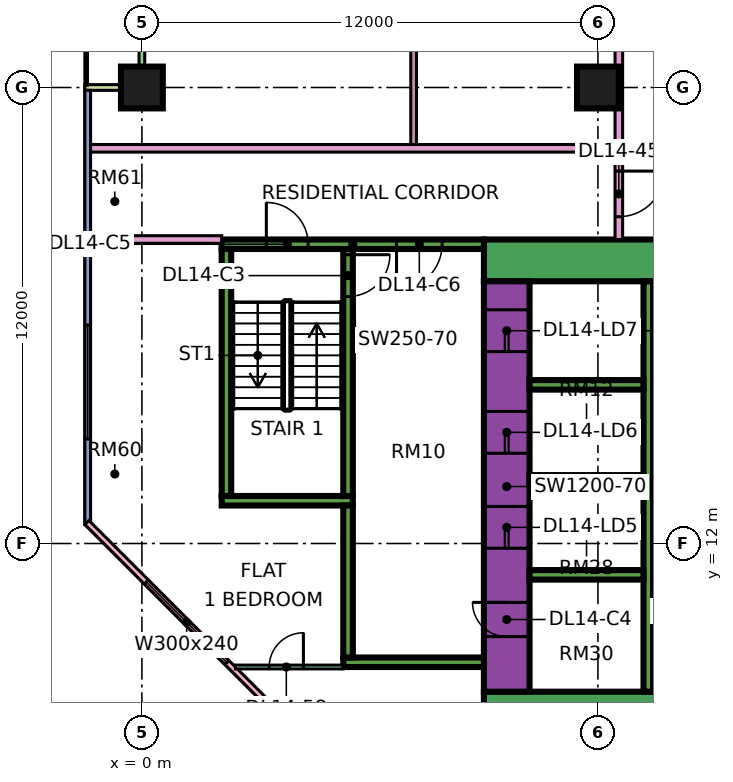
"""IFC4 building model, lengths in metres.
Left out: names, types, materials, properties, quantities, classifications, styles, units other than length and angle.
Written with IfcOpenShell. Run it as: python <this file> out.ifc"""

import sys

from ifc_helpers import new_model, si_unit, direction, frame, frame_2d, origin, origin_2d, place, context, subcontext, project, spatial, rectangle, extrude, element, fill, save


model = new_model("IFC4")
c1 = context("Model", 3, precision=1e-05, world=origin(), true_north=direction((0.0, 1.0)))
c2 = subcontext(c1, "Body", "Model", "MODEL_VIEW")
j1 = project(units=[si_unit("LENGTHUNIT", "METRE"), si_unit("PLANEANGLEUNIT", "RADIAN")], contexts=[c1])
p1 = place(None, origin())
s1 = spatial("IfcSite", under=j1, at=p1, CompositionType="ELEMENT")
p2 = place(p1, origin())
s2 = spatial("IfcBuilding", under=s1, at=p2, CompositionType="ELEMENT")
p3 = place(p2, frame((0.0, 0.0, 67.65)))
s3 = spatial("IfcBuildingStorey", under=s2, at=p3, CompositionType="ELEMENT", Elevation=67.65)
for number, where, z_axis, x_axis in (
    (1, (0.0, 24.0, 0.0), (0.0, 0.0, 1.0), (1.0, 0.0, 0.0)),
    (2, (12.0, 24.0, 0.0), (0.0, 0.0, 1.0), (1.0, 0.0, 0.0)),
):
    element("IfcColumn", number, at=place(p3, frame(where, z_axis=z_axis, x_axis=x_axis)), inside=s3, PredefinedType="COLUMN", context=c2, shape_type="SweptSolid", body=[
        extrude(rectangle(XDim=1.1, YDim=1.1, at=origin_2d()), origin(), (0.0, 0.0, 1.0), 3.75),
    ])
p4 = place(p3, frame((9.0, 7.55, 0.0), z_axis=(0.0, 0.0, 1.0), x_axis=(1.0, 0.0, 0.0)))
e3 = element("IfcWall", 3, at=p4, inside=s3, PredefinedType="SHEAR", context=c2, shape_type="SweptSolid", body=[
    extrude(rectangle(XDim=25.0, YDim=1.1, at=frame_2d((12.5, 0.0))), origin(), (0.0, 0.0, 1.0), 3.75),
])
p5 = place(p3, frame((9.0, 19.45, 0.0), z_axis=(0.0, 0.0, 1.0), x_axis=(1.0, 0.0, 0.0)))
e4 = element("IfcWall", 4, at=p5, inside=s3, PredefinedType="SHEAR", context=c2, shape_type="SweptSolid", body=[
    extrude(rectangle(XDim=25.0, YDim=1.1, at=frame_2d((12.5, 0.0))), origin(), (0.0, 0.0, 1.0), 3.75),
])
p6 = place(p5, frame((19.1, 0.0, 0.0)))
e5 = element("IfcOpeningElement", 5, at=p6, cuts=e4, PredefinedType="OPENING", context=c2, shape_type="SweptSolid", body=[
    extrude(rectangle(XDim=1.8, YDim=2.4, at=frame_2d((0.9, 1.2))), frame((0.0, 0.56, 0.0), z_axis=(0.0, -1.0, 0.0), x_axis=(1.0, 0.0, 0.0)), (0.0, 0.0, 1.0), 1.12),
])
p7 = place(p3, frame((9.6, 8.1, 0.0), z_axis=(0.0, 0.0, 1.0), x_axis=(0.0, 1.0, 0.0)))
e6 = element("IfcWall", 6, at=p7, inside=s3, PredefinedType="SHEAR", context=c2, shape_type="SweptSolid", body=[
    extrude(rectangle(XDim=10.8, YDim=1.2, at=frame_2d((5.4, 0.0))), origin(), (0.0, 0.0, 1.0), 3.75),
])
p8 = place(p7, frame((3.775, 0.0, 0.0)))
e7 = element("IfcOpeningElement", 7, at=p8, cuts=e6, PredefinedType="OPENING", context=c2, shape_type="SweptSolid", body=[
    extrude(rectangle(XDim=1.1, YDim=2.2, at=frame_2d((0.55, 1.1))), frame((0.0, 0.61, 0.0), z_axis=(0.0, -1.0, 0.0), x_axis=(1.0, 0.0, 0.0)), (0.0, 0.0, 1.0), 1.22),
])
p9 = place(p7, frame((6.275, 0.0, 0.0)))
e8 = element("IfcOpeningElement", 8, at=p9, cuts=e6, PredefinedType="OPENING", context=c2, shape_type="SweptSolid", body=[
    extrude(rectangle(XDim=1.1, YDim=2.2, at=frame_2d((0.55, 1.1))), frame((0.0, 0.61, 0.0), z_axis=(0.0, -1.0, 0.0), x_axis=(1.0, 0.0, 0.0)), (0.0, 0.0, 1.0), 1.22),
])
p10 = place(p7, frame((8.95, 0.0, 0.0)))
e9 = element("IfcOpeningElement", 9, at=p10, cuts=e6, PredefinedType="OPENING", context=c2, shape_type="SweptSolid", body=[
    extrude(rectangle(XDim=1.1, YDim=2.2, at=frame_2d((0.55, 1.1))), frame((0.0, 0.61, 0.0), z_axis=(0.0, -1.0, 0.0), x_axis=(1.0, 0.0, 0.0)), (0.0, 0.0, 1.0), 1.22),
])
p11 = place(p7, frame((1.45, 0.0, 0.0)))
e10 = element("IfcOpeningElement", 10, at=p11, cuts=e6, PredefinedType="OPENING", context=c2, shape_type="SweptSolid", body=[
    extrude(rectangle(XDim=0.9, YDim=2.1, at=frame_2d((0.45, 1.05))), frame((0.0, 0.61, 0.0), z_axis=(0.0, -1.0, 0.0), x_axis=(1.0, 0.0, 0.0)), (0.0, 0.0, 1.0), 1.22),
])
p12 = place(p3, frame((13.325, 8.1, 0.0), z_axis=(0.0, 0.0, 1.0), x_axis=(0.0, 1.0, 0.0)))
e11 = element("IfcWall", 11, at=p12, inside=s3, PredefinedType="SHEAR", context=c2, shape_type="SweptSolid", body=[
    extrude(rectangle(XDim=10.8, YDim=0.25, at=frame_2d((5.4, 0.0))), origin(), (0.0, 0.0, 1.0), 3.75),
])
p13 = place(p3, frame((13.45, 11.325, 0.0), z_axis=(0.0, 0.0, 1.0), x_axis=(1.0, 0.0, 0.0)))
e12 = element("IfcWall", 12, at=p13, inside=s3, PredefinedType="SHEAR", context=c2, shape_type="SweptSolid", body=[
    extrude(rectangle(XDim=19.45, YDim=0.25, at=frame_2d((9.725, 0.0))), origin(), (0.0, 0.0, 1.0), 3.75),
])
p14 = place(p13, frame((0.65, 0.0, 0.0)))
e13 = element("IfcOpeningElement", 13, at=p14, cuts=e12, PredefinedType="OPENING", context=c2, shape_type="SweptSolid", body=[
    extrude(rectangle(XDim=1.2, YDim=2.2, at=frame_2d((0.6, 1.1))), frame((0.0, 0.135, 0.0), z_axis=(0.0, -1.0, 0.0), x_axis=(1.0, 0.0, 0.0)), (0.0, 0.0, 1.0), 0.27),
])
p15 = place(p13, frame((3.4, 0.0, 0.0)))
e14 = element("IfcOpeningElement", 14, at=p15, cuts=e12, PredefinedType="OPENING", context=c2, shape_type="SweptSolid", body=[
    extrude(rectangle(XDim=1.2, YDim=2.2, at=frame_2d((0.6, 1.1))), frame((0.0, 0.135, 0.0), z_axis=(0.0, -1.0, 0.0), x_axis=(1.0, 0.0, 0.0)), (0.0, 0.0, 1.0), 0.27),
])
p16 = place(p13, frame((6.15, 0.0, 0.0)))
e15 = element("IfcOpeningElement", 15, at=p16, cuts=e12, PredefinedType="OPENING", context=c2, shape_type="SweptSolid", body=[
    extrude(rectangle(XDim=1.2, YDim=2.2, at=frame_2d((0.6, 1.1))), frame((0.0, 0.135, 0.0), z_axis=(0.0, -1.0, 0.0), x_axis=(1.0, 0.0, 0.0)), (0.0, 0.0, 1.0), 0.27),
])
p17 = place(p13, frame((8.9, 0.0, 0.0)))
e16 = element("IfcOpeningElement", 16, at=p17, cuts=e12, PredefinedType="OPENING", context=c2, shape_type="SweptSolid", body=[
    extrude(rectangle(XDim=1.2, YDim=2.2, at=frame_2d((0.6, 1.1))), frame((0.0, 0.135, 0.0), z_axis=(0.0, -1.0, 0.0), x_axis=(1.0, 0.0, 0.0)), (0.0, 0.0, 1.0), 0.27),
])
p18 = place(p3, frame((13.45, 15.675, 0.0), z_axis=(0.0, 0.0, 1.0), x_axis=(1.0, 0.0, 0.0)))
e17 = element("IfcWall", 17, at=p18, inside=s3, PredefinedType="SHEAR", context=c2, shape_type="SweptSolid", body=[
    extrude(rectangle(XDim=13.75, YDim=0.25, at=frame_2d((6.875, 0.0))), origin(), (0.0, 0.0, 1.0), 3.75),
])
for number, where, z_axis, x_axis in (
    (18, (10.2, 11.175, 0.0), (0.0, 0.0, 1.0), (1.0, 0.0, 0.0)),
    (19, (10.2, 13.675, 0.0), (0.0, 0.0, 1.0), (1.0, 0.0, 0.0)),
    (20, (10.2, 16.175, 0.0), (0.0, 0.0, 1.0), (1.0, 0.0, 0.0)),
):
    element("IfcWall", number, at=place(p3, frame(where, z_axis=z_axis, x_axis=x_axis)), inside=s3, PredefinedType="SHEAR", context=c2, shape_type="SweptSolid", body=[
        extrude(rectangle(XDim=3.0, YDim=0.25, at=frame_2d((1.5, 0.0))), origin(), (0.0, 0.0, 1.0), 3.75),
    ])
p19 = place(p3, frame((2.1, 19.875, 0.0), z_axis=(0.0, 0.0, 1.0), x_axis=(1.0, 0.0, 0.0)))
e21 = element("IfcWall", 21, at=p19, inside=s3, PredefinedType="SHEAR", context=c2, shape_type="SweptSolid", body=[
    extrude(rectangle(XDim=6.9, YDim=0.25, at=frame_2d((3.45, 0.0))), origin(), (0.0, 0.0, 1.0), 3.75),
])
p20 = place(p19, frame((1.175, 0.0, 0.0)))
e22 = element("IfcOpeningElement", 22, at=p20, cuts=e21, PredefinedType="OPENING", context=c2, shape_type="SweptSolid", body=[
    extrude(rectangle(XDim=1.1, YDim=2.2, at=frame_2d((0.55, 1.1))), frame((0.0, 0.135, 0.0), z_axis=(0.0, -1.0, 0.0), x_axis=(1.0, 0.0, 0.0)), (0.0, 0.0, 1.0), 0.27),
])
p21 = place(p19, frame((4.6, 0.0, 0.0)))
e23 = element("IfcOpeningElement", 23, at=p21, cuts=e21, PredefinedType="OPENING", context=c2, shape_type="SweptSolid", body=[
    extrude(rectangle(XDim=1.2, YDim=2.2, at=frame_2d((0.6, 1.1))), frame((0.0, 0.135, 0.0), z_axis=(0.0, -1.0, 0.0), x_axis=(1.0, 0.0, 0.0)), (0.0, 0.0, 1.0), 0.27),
])
p22 = place(p3, frame((2.1, 13.125, 0.0), z_axis=(0.0, 0.0, 1.0), x_axis=(1.0, 0.0, 0.0)))
e24 = element("IfcWall", 24, at=p22, inside=s3, PredefinedType="SHEAR", context=c2, shape_type="SweptSolid", body=[
    extrude(rectangle(XDim=3.45, YDim=0.25, at=frame_2d((1.725, 0.0))), origin(), (0.0, 0.0, 1.0), 3.75),
])
p23 = place(p3, frame((2.225, 13.25, 0.0), z_axis=(0.0, 0.0, 1.0), x_axis=(0.0, 1.0, 0.0)))
e25 = element("IfcWall", 25, at=p23, inside=s3, PredefinedType="SHEAR", context=c2, shape_type="SweptSolid", body=[
    extrude(rectangle(XDim=6.5, YDim=0.25, at=frame_2d((3.25, 0.0))), origin(), (0.0, 0.0, 1.0), 3.75),
])
p24 = place(p3, frame((5.425, 13.25, 0.0), z_axis=(0.0, 0.0, 1.0), x_axis=(0.0, 1.0, 0.0)))
e26 = element("IfcWall", 26, at=p24, inside=s3, PredefinedType="SHEAR", context=c2, shape_type="SweptSolid", body=[
    extrude(rectangle(XDim=6.5, YDim=0.25, at=frame_2d((3.25, 0.0))), origin(), (0.0, 0.0, 1.0), 3.75),
])
p25 = place(p24, frame((5.25, 0.0, 0.0)))
e27 = element("IfcOpeningElement", 27, at=p25, cuts=e26, PredefinedType="OPENING", context=c2, shape_type="SweptSolid", body=[
    extrude(rectangle(XDim=1.1, YDim=2.2, at=frame_2d((0.55, 1.1))), frame((0.0, 0.135, 0.0), z_axis=(0.0, -1.0, 0.0), x_axis=(1.0, 0.0, 0.0)), (0.0, 0.0, 1.0), 0.27),
])
p26 = place(p3, frame((5.3, 8.875, 0.0), z_axis=(0.0, 0.0, 1.0), x_axis=(1.0, 0.0, 0.0)))
e28 = element("IfcWall", 28, at=p26, inside=s3, PredefinedType="SHEAR", context=c2, shape_type="SweptSolid", body=[
    extrude(rectangle(XDim=3.7, YDim=0.25, at=frame_2d((1.85, 0.0))), origin(), (0.0, 0.0, 1.0), 3.75),
])
p27 = place(p3, frame((5.425, 9.0, 0.0), z_axis=(0.0, 0.0, 1.0), x_axis=(0.0, 1.0, 0.0)))
e29 = element("IfcWall", 29, at=p27, inside=s3, PredefinedType="SHEAR", context=c2, shape_type="SweptSolid", body=[
    extrude(rectangle(XDim=4.0, YDim=0.25, at=frame_2d((2.0, 0.0))), origin(), (0.0, 0.0, 1.0), 3.75),
])
p28 = place(p3, frame((0.0, 35.925, 0.0), z_axis=(0.0, 0.0, 1.0), x_axis=(0.0, -1.0, 0.0)))
e30 = element("IfcWall", 30, at=p28, inside=s3, PredefinedType="SOLIDWALL", context=c2, shape_type="SweptSolid", body=[
    extrude(rectangle(XDim=11.85, YDim=0.15, at=frame_2d((5.925, 0.0))), origin(), (0.0, 0.0, 1.0), 3.35),
])
p29 = place(p28, frame((2.35, 0.0, 0.0)))
e31 = element("IfcOpeningElement", 31, at=p29, cuts=e30, PredefinedType="OPENING", context=c2, shape_type="SweptSolid", body=[
    extrude(rectangle(XDim=1.8, YDim=2.4, at=frame_2d((0.9, 1.2))), frame((0.0, 0.085, 0.0), z_axis=(0.0, -1.0, 0.0), x_axis=(1.0, 0.0, 0.0)), (0.0, 0.0, 1.0), 0.17),
])
p30 = place(p28, frame((7.1, 0.0, 0.45)))
e32 = element("IfcOpeningElement", 32, at=p30, cuts=e30, PredefinedType="OPENING", context=c2, shape_type="SweptSolid", body=[
    extrude(rectangle(XDim=3.0, YDim=2.4, at=frame_2d((1.5, 1.2))), frame((0.0, 0.085, 0.0), z_axis=(0.0, -1.0, 0.0), x_axis=(1.0, 0.0, 0.0)), (0.0, 0.0, 1.0), 0.17),
])
p31 = place(p3, frame((-1.5, 24.0, 0.0), z_axis=(0.0, 0.0, 1.0), x_axis=(1.0, 0.0, 0.0)))
e33 = element("IfcWall", 33, at=p31, inside=s3, PredefinedType="SOLIDWALL", context=c2, shape_type="SweptSolid", body=[
    extrude(rectangle(XDim=1.5, YDim=0.15, at=frame_2d((0.75, 0.0))), origin(), (0.0, 0.0, 1.0), 3.35),
])
p32 = place(p3, frame((-1.425, 23.925, 0.0), z_axis=(0.0, 0.0, 1.0), x_axis=(0.0, -1.0, 0.0)))
e34 = element("IfcWall", 34, at=p32, inside=s3, PredefinedType="SOLIDWALL", context=c2, shape_type="SweptSolid", body=[
    extrude(rectangle(XDim=11.425, YDim=0.15, at=frame_2d((5.712, 0.0))), origin(), (0.0, 0.0, 1.0), 3.35),
])
p33 = place(p32, frame((6.175, 0.0, 0.45)))
e35 = element("IfcOpeningElement", 35, at=p33, cuts=e34, PredefinedType="OPENING", context=c2, shape_type="SweptSolid", body=[
    extrude(rectangle(XDim=3.0, YDim=2.4, at=frame_2d((1.5, 1.2))), frame((0.0, 0.085, 0.0), z_axis=(0.0, -1.0, 0.0), x_axis=(1.0, 0.0, 0.0)), (0.0, 0.0, 1.0), 0.17),
])
p34 = place(p3, frame((-1.447, 12.553, 0.0), z_axis=(0.0, 0.0, 1.0), x_axis=(0.707106781187, -0.707106781187, 0.0)))
e36 = element("IfcWall", 36, at=p34, inside=s3, PredefinedType="SOLIDWALL", context=c2, shape_type="SweptSolid", body=[
    extrude(rectangle(XDim=19.799, YDim=0.15, at=frame_2d((9.899, 0.0))), origin(), (0.0, 0.0, 1.0), 3.35),
])
p35 = place(p34, frame((2.212, 0.0, 0.45)))
e37 = element("IfcOpeningElement", 37, at=p35, cuts=e36, PredefinedType="OPENING", context=c2, shape_type="SweptSolid", body=[
    extrude(rectangle(XDim=3.0, YDim=2.4, at=frame_2d((1.5, 1.2))), frame((0.0, 0.085, 0.0), z_axis=(0.0, -1.0, 0.0), x_axis=(1.0, 0.0, 0.0)), (0.0, 0.0, 1.0), 0.17),
])
p36 = place(p34, frame((10.216, 0.0, 0.45)))
e38 = element("IfcOpeningElement", 38, at=p36, cuts=e36, PredefinedType="OPENING", context=c2, shape_type="SweptSolid", body=[
    extrude(rectangle(XDim=3.0, YDim=2.4, at=frame_2d((1.5, 1.2))), frame((0.0, 0.085, 0.0), z_axis=(0.0, -1.0, 0.0), x_axis=(1.0, 0.0, 0.0)), (0.0, 0.0, 1.0), 0.17),
])
p37 = place(p3, frame((-1.35, 20.0, 0.0), z_axis=(0.0, 0.0, 1.0), x_axis=(1.0, 0.0, 0.0)))
e39 = element("IfcWall", 39, at=p37, inside=s3, PredefinedType="PARTITIONING", context=c2, shape_type="SweptSolid", body=[
    extrude(rectangle(XDim=3.45, YDim=0.2, at=frame_2d((1.725, 0.0))), origin(), (0.0, 0.0, 1.0), 3.35),
])
p38 = place(p3, frame((-1.35, 22.4, 0.0), z_axis=(0.0, 0.0, 1.0), x_axis=(1.0, 0.0, 0.0)))
e40 = element("IfcWall", 40, at=p38, inside=s3, PredefinedType="PARTITIONING", context=c2, shape_type="SweptSolid", body=[
    extrude(rectangle(XDim=13.8, YDim=0.2, at=frame_2d((6.9, 0.0))), origin(), (0.0, 0.0, 1.0), 3.35),
])
p39 = place(p3, frame((2.461, 8.75, 0.0), z_axis=(0.0, 0.0, 1.0), x_axis=(1.0, 0.0, 0.0)))
e41 = element("IfcWall", 41, at=p39, inside=s3, PredefinedType="PARTITIONING", context=c2, shape_type="SweptSolid", body=[
    extrude(rectangle(XDim=2.839, YDim=0.1, at=frame_2d((1.419, 0.0))), origin(), (0.0, 0.0, 1.0), 3.35),
])
p40 = place(p39, frame((0.889, 0.0, 0.0)))
e42 = element("IfcOpeningElement", 42, at=p40, cuts=e41, PredefinedType="OPENING", context=c2, shape_type="SweptSolid", body=[
    extrude(rectangle(XDim=0.9, YDim=2.1, at=frame_2d((0.45, 1.05))), frame((0.0, 0.06, 0.0), z_axis=(0.0, -1.0, 0.0), x_axis=(1.0, 0.0, 0.0)), (0.0, 0.0, 1.0), 0.12),
])
p41 = place(p3, frame((7.15, 22.5, 0.0), z_axis=(0.0, 0.0, 1.0), x_axis=(0.0, 1.0, 0.0)))
e43 = element("IfcWall", 43, at=p41, inside=s3, PredefinedType="PARTITIONING", context=c2, shape_type="SweptSolid", body=[
    extrude(rectangle(XDim=11.175, YDim=0.15, at=frame_2d((5.587, 0.0))), origin(), (0.0, 0.0, 1.0), 3.35),
])
p42 = place(p41, frame((2.9, 0.0, 0.0)))
e44 = element("IfcOpeningElement", 44, at=p42, cuts=e43, PredefinedType="OPENING", context=c2, shape_type="SweptSolid", body=[
    extrude(rectangle(XDim=0.9, YDim=2.1, at=frame_2d((0.45, 1.05))), frame((0.0, 0.085, 0.0), z_axis=(0.0, -1.0, 0.0), x_axis=(1.0, 0.0, 0.0)), (0.0, 0.0, 1.0), 0.17),
])
p43 = place(p3, frame((12.55, 20.0, 0.0), z_axis=(0.0, 0.0, 1.0), x_axis=(0.0, 1.0, 0.0)))
e45 = element("IfcWall", 45, at=p43, inside=s3, PredefinedType="PARTITIONING", context=c2, shape_type="SweptSolid", body=[
    extrude(rectangle(XDim=43.0, YDim=0.2, at=frame_2d((21.5, 0.0))), origin(), (0.0, 0.0, 1.0), 3.35),
])
p44 = place(p43, frame((25.8, 0.0, 0.0)))
e46 = element("IfcOpeningElement", 46, at=p44, cuts=e45, PredefinedType="OPENING", context=c2, shape_type="SweptSolid", body=[
    extrude(rectangle(XDim=1.0, YDim=2.1, at=frame_2d((0.5, 1.05))), frame((0.0, 0.11, 0.0), z_axis=(0.0, -1.0, 0.0), x_axis=(1.0, 0.0, 0.0)), (0.0, 0.0, 1.0), 0.22),
])
p45 = place(p43, frame((0.6, 0.0, 0.0)))
e47 = element("IfcOpeningElement", 47, at=p45, cuts=e45, PredefinedType="OPENING", context=c2, shape_type="SweptSolid", body=[
    extrude(rectangle(XDim=1.2, YDim=2.1, at=frame_2d((0.6, 1.05))), frame((0.0, 0.11, 0.0), z_axis=(0.0, -1.0, 0.0), x_axis=(1.0, 0.0, 0.0)), (0.0, 0.0, 1.0), 0.22),
])
p46 = place(p43, frame((14.25, 0.0, 0.0)))
e48 = element("IfcOpeningElement", 48, at=p46, cuts=e45, PredefinedType="OPENING", context=c2, shape_type="SweptSolid", body=[
    extrude(rectangle(XDim=1.0, YDim=2.1, at=frame_2d((0.5, 1.05))), frame((0.0, 0.11, 0.0), z_axis=(0.0, -1.0, 0.0), x_axis=(1.0, 0.0, 0.0)), (0.0, 0.0, 1.0), 0.22),
])
p47 = place(p33, origin())
e49 = element("IfcWindow", 49, at=p47, inside=s3, PartitioningType="SINGLE_PANEL", PredefinedType="WINDOW", context=c2, shape_type="SweptSolid", body=[
    extrude(rectangle(XDim=3.0, YDim=2.4, at=frame_2d((1.5, 1.2))), frame((0.0, 0.03, 0.0), z_axis=(0.0, -1.0, 0.0), x_axis=(1.0, 0.0, 0.0)), (0.0, 0.0, 1.0), 0.06),
])
fill(e35, e49)
p48 = place(p35, origin())
e50 = element("IfcWindow", 50, at=p48, inside=s3, PartitioningType="SINGLE_PANEL", PredefinedType="WINDOW", context=c2, shape_type="SweptSolid", body=[
    extrude(rectangle(XDim=3.0, YDim=2.4, at=frame_2d((1.5, 1.2))), frame((0.0, 0.03, 0.0), z_axis=(0.0, -1.0, 0.0), x_axis=(1.0, 0.0, 0.0)), (0.0, 0.0, 1.0), 0.06),
])
fill(e37, e50)
p49 = place(p8, origin())
e51 = element("IfcDoor", 51, at=p49, inside=s3, OperationType="DOUBLE_DOOR_SLIDING", PredefinedType="DOOR", context=c2, shape_type="SweptSolid", body=[
    extrude(rectangle(XDim=1.1, YDim=2.2, at=frame_2d((0.55, 1.1))), frame((0.0, 0.025, 0.0), z_axis=(0.0, -1.0, 0.0), x_axis=(1.0, 0.0, 0.0)), (0.0, 0.0, 1.0), 0.05),
])
fill(e7, e51)
p50 = place(p9, origin())
e52 = element("IfcDoor", 52, at=p50, inside=s3, OperationType="DOUBLE_DOOR_SLIDING", PredefinedType="DOOR", context=c2, shape_type="SweptSolid", body=[
    extrude(rectangle(XDim=1.1, YDim=2.2, at=frame_2d((0.55, 1.1))), frame((0.0, 0.025, 0.0), z_axis=(0.0, -1.0, 0.0), x_axis=(1.0, 0.0, 0.0)), (0.0, 0.0, 1.0), 0.05),
])
fill(e8, e52)
p51 = place(p10, origin())
e53 = element("IfcDoor", 53, at=p51, inside=s3, OperationType="DOUBLE_DOOR_SLIDING", PredefinedType="DOOR", context=c2, shape_type="SweptSolid", body=[
    extrude(rectangle(XDim=1.1, YDim=2.2, at=frame_2d((0.55, 1.1))), frame((0.0, 0.025, 0.0), z_axis=(0.0, -1.0, 0.0), x_axis=(1.0, 0.0, 0.0)), (0.0, 0.0, 1.0), 0.05),
])
fill(e9, e53)
p52 = place(p25, origin())
e54 = element("IfcDoor", 54, at=p52, inside=s3, OperationType="SINGLE_SWING_RIGHT", PredefinedType="DOOR", context=c2, shape_type="SweptSolid", body=[
    extrude(rectangle(XDim=1.1, YDim=2.2, at=frame_2d((0.55, 1.1))), frame((0.0, 0.025, 0.0), z_axis=(0.0, -1.0, 0.0), x_axis=(1.0, 0.0, 0.0)), (0.0, 0.0, 1.0), 0.05),
])
fill(e27, e54)
p53 = place(p11, frame((0.9, 0.0, 0.0), z_axis=(0.0, 0.0, 1.0), x_axis=(-1.0, 0.0, 0.0)))
e55 = element("IfcDoor", 55, at=p53, inside=s3, OperationType="SINGLE_SWING_RIGHT", PredefinedType="DOOR", context=c2, shape_type="SweptSolid", body=[
    extrude(rectangle(XDim=0.9, YDim=2.1, at=frame_2d((0.45, 1.05))), frame((0.0, 0.025, 0.0), z_axis=(0.0, -1.0, 0.0), x_axis=(1.0, 0.0, 0.0)), (0.0, 0.0, 1.0), 0.05),
])
fill(e10, e55)
p54 = place(p20, origin())
e56 = element("IfcDoor", 56, at=p54, inside=s3, OperationType="SINGLE_SWING_LEFT", PredefinedType="DOOR", context=c2, shape_type="SweptSolid", body=[
    extrude(rectangle(XDim=1.1, YDim=2.2, at=frame_2d((0.55, 1.1))), frame((0.0, 0.025, 0.0), z_axis=(0.0, -1.0, 0.0), x_axis=(1.0, 0.0, 0.0)), (0.0, 0.0, 1.0), 0.05),
])
fill(e22, e56)
p55 = place(p21, frame((1.2, 0.0, 0.0), z_axis=(0.0, 0.0, 1.0), x_axis=(-1.0, 0.0, 0.0)))
e57 = element("IfcDoor", 57, at=p55, inside=s3, OperationType="SINGLE_SWING_LEFT", PredefinedType="DOOR", context=c2, shape_type="SweptSolid", body=[
    extrude(rectangle(XDim=1.2, YDim=2.2, at=frame_2d((0.6, 1.1))), frame((0.0, 0.025, 0.0), z_axis=(0.0, -1.0, 0.0), x_axis=(1.0, 0.0, 0.0)), (0.0, 0.0, 1.0), 0.05),
])
fill(e23, e57)
p56 = place(p45, origin())
e58 = element("IfcDoor", 58, at=p56, inside=s3, OperationType="SINGLE_SWING_RIGHT", PredefinedType="DOOR", context=c2, shape_type="SweptSolid", body=[
    extrude(rectangle(XDim=1.2, YDim=2.1, at=frame_2d((0.6, 1.05))), frame((0.0, 0.025, 0.0), z_axis=(0.0, -1.0, 0.0), x_axis=(1.0, 0.0, 0.0)), (0.0, 0.0, 1.0), 0.05),
])
fill(e47, e58)
p57 = place(p40, frame((0.9, 0.0, 0.0), z_axis=(0.0, 0.0, 1.0), x_axis=(-1.0, 0.0, 0.0)))
e59 = element("IfcDoor", 59, at=p57, inside=s3, OperationType="SINGLE_SWING_RIGHT", PredefinedType="DOOR", context=c2, shape_type="SweptSolid", body=[
    extrude(rectangle(XDim=0.9, YDim=2.1, at=frame_2d((0.45, 1.05))), frame((0.0, 0.025, 0.0), z_axis=(0.0, -1.0, 0.0), x_axis=(1.0, 0.0, 0.0)), (0.0, 0.0, 1.0), 0.05),
])
fill(e42, e59)
save(model, sys.argv[1])
